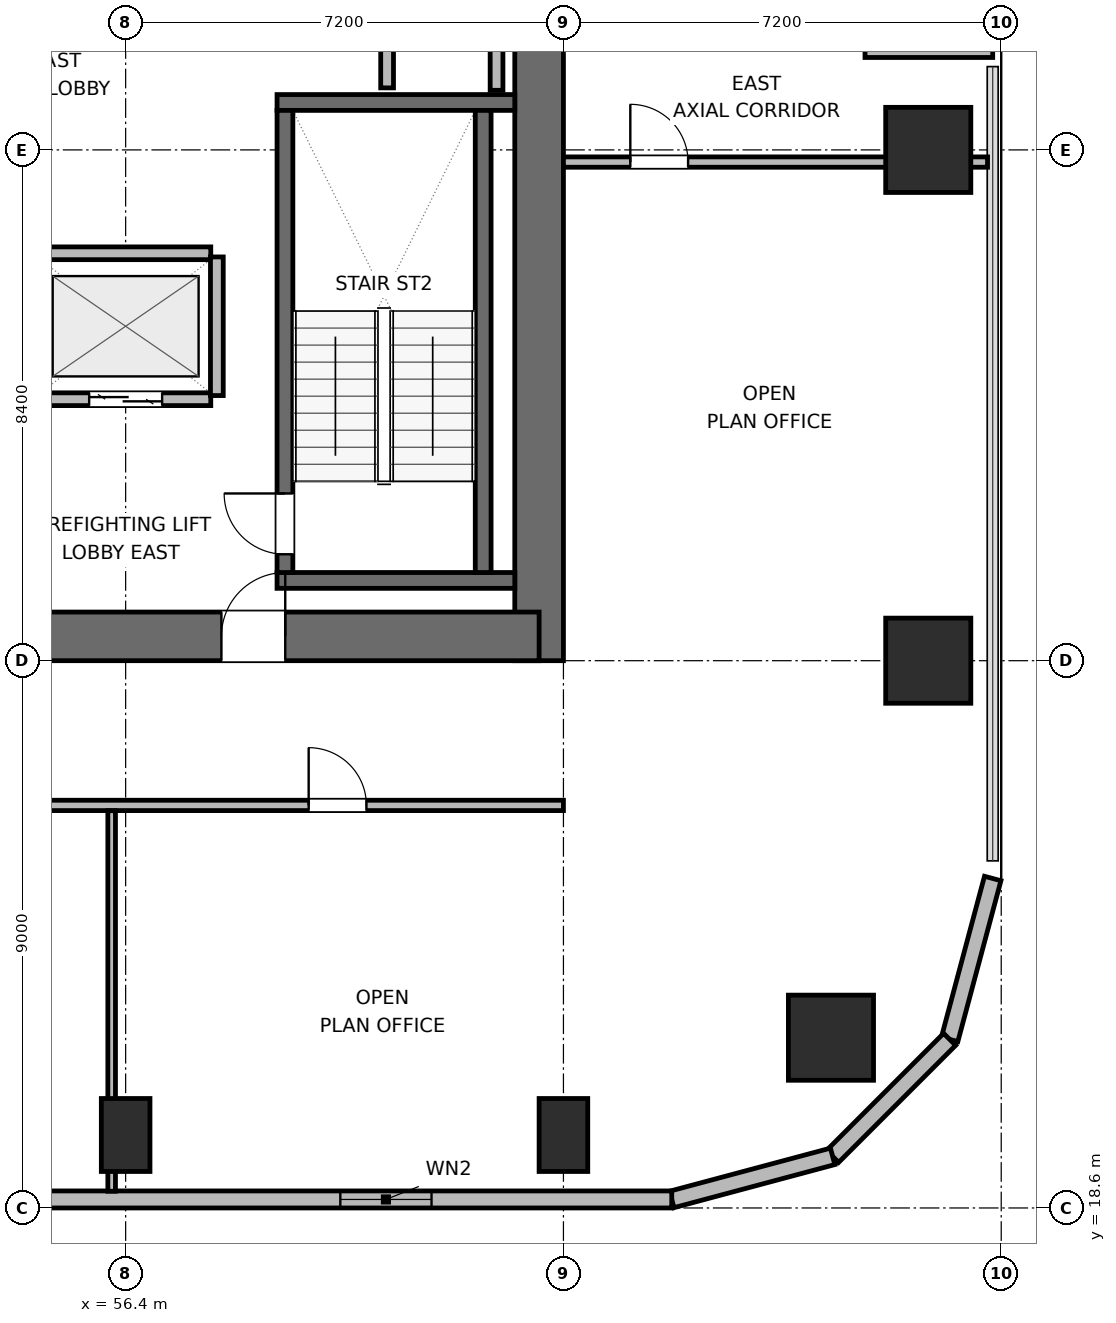
"""IFC4 building model, lengths in metres.
Left out: names, types, materials, properties, quantities, classifications, styles, units other than length and angle.
Written with IfcOpenShell. Run it as: python <this file> out.ifc"""

import sys

from ifc_helpers import new_model, si_unit, direction, frame, frame_2d, origin, origin_2d, place, context, subcontext, project, spatial, rectangle, circle, extrude, element, fill, save


model = new_model("IFC4")
c1 = context("Model", 3, precision=1e-05, world=origin(), true_north=direction((0.0, 1.0)))
c2 = subcontext(c1, "Body", "Model", "MODEL_VIEW")
j1 = project(units=[si_unit("LENGTHUNIT", "METRE"), si_unit("PLANEANGLEUNIT", "RADIAN")], contexts=[c1])
p1 = place(None, origin())
s1 = spatial("IfcSite", under=j1, at=p1, CompositionType="ELEMENT")
p2 = place(p1, origin())
s2 = spatial("IfcBuilding", under=s1, at=p2, CompositionType="ELEMENT")
p3 = place(p2, frame((0.0, 0.0, 154.5)))
s3 = spatial("IfcBuildingStorey", under=s2, at=p3, CompositionType="ELEMENT", Elevation=154.5)
p4 = place(p3, frame((63.2, 27.6, 0.0), z_axis=(0.0, 0.0, 1.0), x_axis=(0.0, 1.0, 0.0)))
e1 = element("IfcWall", 1, at=p4, inside=s3, PredefinedType="SHEAR", context=c2, shape_type="SweptSolid", body=[
    extrude(rectangle(XDim=16.8, YDim=0.8, at=frame_2d((8.4, 0.0))), origin(), (0.0, 0.0, 1.0), 3.9),
])
p5 = place(p3, frame((54.0, 28.0, 0.0), z_axis=(0.0, 0.0, 1.0), x_axis=(1.0, 0.0, 0.0)))
e2 = element("IfcWall", 2, at=p5, inside=s3, PredefinedType="SHEAR", context=c2, shape_type="SweptSolid", body=[
    extrude(rectangle(XDim=9.2, YDim=0.8, at=frame_2d((4.6, 0.0))), origin(), (0.0, 0.0, 1.0), 3.9),
])
p6 = place(p5, frame((3.975, 0.0, 0.0)))
e3 = element("IfcOpeningElement", 3, at=p6, cuts=e2, PredefinedType="OPENING", context=c2, shape_type="SweptSolid", body=[
    extrude(rectangle(XDim=1.05, YDim=2.04, at=frame_2d((0.525, 1.02))), frame((0.0, 0.41, 0.0), z_axis=(0.0, -1.0, 0.0), x_axis=(1.0, 0.0, 0.0)), (0.0, 0.0, 1.0), 0.82),
])
for number, where, z_axis, x_axis in (
    (4, (58.89, 28.92, 0.0), (0.0, 0.0, 1.0), (1.0, 0.0, 0.0)),
    (5, (58.89, 36.78, 0.0), (0.0, 0.0, 1.0), (1.0, 0.0, 0.0)),
):
    element("IfcWall", number, at=place(p3, frame(where, z_axis=z_axis, x_axis=x_axis)), inside=s3, PredefinedType="SHEAR", context=c2, shape_type="SweptSolid", body=[
        extrude(rectangle(XDim=3.91, YDim=0.26, at=frame_2d((1.955, 0.0))), origin(), (0.0, 0.0, 1.0), 3.9),
    ])
p7 = place(p3, frame((59.02, 29.05, 0.0), z_axis=(0.0, 0.0, 1.0), x_axis=(0.0, 1.0, 0.0)))
e6 = element("IfcWall", 6, at=p7, inside=s3, PredefinedType="SHEAR", context=c2, shape_type="SweptSolid", body=[
    extrude(rectangle(XDim=7.6, YDim=0.26, at=frame_2d((3.8, 0.0))), origin(), (0.0, 0.0, 1.0), 3.9),
])
p8 = place(p7, frame((0.3, 0.0, 0.0)))
e7 = element("IfcOpeningElement", 7, at=p8, cuts=e6, PredefinedType="OPENING", context=c2, shape_type="SweptSolid", body=[
    extrude(rectangle(XDim=1.0, YDim=2.04, at=frame_2d((0.5, 1.02))), frame((0.0, 0.14, 0.0), z_axis=(0.0, -1.0, 0.0), x_axis=(1.0, 0.0, 0.0)), (0.0, 0.0, 1.0), 0.28),
])
p9 = place(p3, frame((62.28, 29.05, 0.0), z_axis=(0.0, 0.0, 1.0), x_axis=(0.0, 1.0, 0.0)))
e8 = element("IfcWall", 8, at=p9, inside=s3, PredefinedType="SHEAR", context=c2, shape_type="SweptSolid", body=[
    extrude(rectangle(XDim=7.6, YDim=0.26, at=frame_2d((3.8, 0.0))), origin(), (0.0, 0.0, 1.0), 3.9),
])
p10 = place(p3, frame((68.0, 21.4, 0.0), z_axis=(0.0, 0.0, 1.0), x_axis=(1.0, 0.0, 0.0)))
e9 = element("IfcColumn", 9, at=p10, inside=s3, PredefinedType="COLUMN", context=c2, shape_type="SweptSolid", body=[
    extrude(circle(Radius=0.7, at=origin_2d()), origin(), (0.0, 0.0, 1.0), 3.9),
])
for number, where, z_axis, x_axis in (
    (10, (56.4, 19.8, 0.0), (0.0, 0.0, 1.0), (1.0, 0.0, 0.0)),
    (11, (63.6, 19.8, 0.0), (0.0, 0.0, 1.0), (1.0, 0.0, 0.0)),
):
    element("IfcColumn", number, at=place(p3, frame(where, z_axis=z_axis, x_axis=x_axis)), inside=s3, PredefinedType="COLUMN", context=c2, shape_type="SweptSolid", body=[
        extrude(rectangle(XDim=0.8, YDim=1.2, at=origin_2d()), origin(), (0.0, 0.0, 1.0), 3.9),
    ])
for number, where, z_axis, x_axis in (
    (12, (69.6, 27.6, 0.0), (0.0, 0.0, 1.0), (1.0, 0.0, 0.0)),
    (13, (69.6, 36.0, 0.0), (0.0, 0.0, 1.0), (1.0, 0.0, 0.0)),
):
    element("IfcColumn", number, at=place(p3, frame(where, z_axis=z_axis, x_axis=x_axis)), inside=s3, PredefinedType="COLUMN", context=c2, shape_type="SweptSolid", body=[
        extrude(rectangle(XDim=1.4, YDim=1.4, at=origin_2d()), origin(), (0.0, 0.0, 1.0), 3.9),
    ])
p11 = place(p3, frame((68.56, 37.66, 0.0), z_axis=(0.0, 0.0, 1.0), x_axis=(1.0, 0.0, 0.0)))
e14 = element("IfcWall", 14, at=p11, inside=s3, PredefinedType="SOLIDWALL", context=c2, shape_type="SweptSolid", body=[
    extrude(rectangle(XDim=2.1, YDim=0.28, at=frame_2d((1.05, 0.0))), origin(), (0.0, 0.0, 1.0), 3.116),
])
p12 = place(p3, frame((70.66, 24.018, 0.0), z_axis=(0.0, 0.0, 1.0), x_axis=(-0.258672222976, -0.9659651552, 0.0)))
e15 = element("IfcWall", 15, at=p12, inside=s3, PredefinedType="SOLIDWALL", context=c2, shape_type="SweptSolid", body=[
    extrude(rectangle(XDim=2.739, YDim=0.28, at=frame_2d((1.37, 0.0))), origin(), (0.0, 0.0, 1.0), 3.68),
])
p13 = place(p3, frame((69.951, 21.373, 0.0), z_axis=(0.0, 0.0, 1.0), x_axis=(-0.707061915429, -0.707151644098, 0.0)))
e16 = element("IfcWall", 16, at=p13, inside=s3, PredefinedType="SOLIDWALL", context=c2, shape_type="SweptSolid", body=[
    extrude(rectangle(XDim=2.721, YDim=0.28, at=frame_2d((1.36, 0.0))), origin(), (0.0, 0.0, 1.0), 3.68),
])
p14 = place(p3, frame((68.028, 19.448, 0.0), z_axis=(0.0, 0.0, 1.0), x_axis=(-0.965971118627, -0.258649952598, 0.0)))
e17 = element("IfcWall", 17, at=p14, inside=s3, PredefinedType="SOLIDWALL", context=c2, shape_type="SweptSolid", body=[
    extrude(rectangle(XDim=2.739, YDim=0.28, at=frame_2d((1.37, 0.0))), origin(), (0.0, 0.0, 1.0), 3.68),
])
p15 = place(p3, frame((65.382, 18.74, 0.0), z_axis=(0.0, 0.0, 1.0), x_axis=(-1.0, 0.0, 0.0)))
e18 = element("IfcWall", 18, at=p15, inside=s3, PredefinedType="SOLIDWALL", context=c2, shape_type="SweptSolid", body=[
    extrude(rectangle(XDim=10.742, YDim=0.28, at=frame_2d((5.371, 0.0))), origin(), (0.0, 0.0, 1.0), 3.68),
])
p16 = place(p15, frame((3.951, 0.0, 0.85)))
e19 = element("IfcOpeningElement", 19, at=p16, cuts=e18, PredefinedType="OPENING", context=c2, shape_type="SweptSolid", body=[
    extrude(rectangle(XDim=1.5, YDim=1.1, at=frame_2d((0.75, 0.55))), frame((0.0, 0.15, 0.0), z_axis=(0.0, -1.0, 0.0), x_axis=(1.0, 0.0, 0.0)), (0.0, 0.0, 1.0), 0.3),
])
p17 = place(p3, frame((60.7, 37.02, 0.0), z_axis=(0.0, 0.0, 1.0), x_axis=(0.0, 1.0, 0.0)))
e20 = element("IfcWall", 20, at=p17, inside=s3, PredefinedType="PARTITIONING", context=c2, shape_type="SweptSolid", body=[
    extrude(rectangle(XDim=1.96, YDim=0.21, at=frame_2d((0.98, 0.0))), origin(), (0.0, 0.0, 1.0), 3.68),
])
p18 = place(p3, frame((62.5, 36.98, 0.0), z_axis=(0.0, 0.0, 1.0), x_axis=(0.0, 1.0, 0.0)))
e21 = element("IfcWall", 21, at=p18, inside=s3, PredefinedType="PARTITIONING", context=c2, shape_type="SweptSolid", body=[
    extrude(rectangle(XDim=2.04, YDim=0.21, at=frame_2d((1.02, 0.0))), origin(), (0.0, 0.0, 1.0), 3.68),
])
p19 = place(p3, frame((55.0, 31.9, 0.0), z_axis=(0.0, 0.0, 1.0), x_axis=(1.0, 0.0, 0.0)))
e22 = element("IfcWall", 22, at=p19, inside=s3, PredefinedType="PARTITIONING", context=c2, shape_type="SweptSolid", body=[
    extrude(rectangle(XDim=2.8, YDim=0.21, at=frame_2d((1.4, 0.0))), origin(), (0.0, 0.0, 1.0), 3.68),
])
p20 = place(p19, frame((0.8, 0.0, 0.0)))
e23 = element("IfcOpeningElement", 23, at=p20, cuts=e22, PredefinedType="OPENING", context=c2, shape_type="SweptSolid", body=[
    extrude(rectangle(XDim=1.2, YDim=2.04, at=frame_2d((0.6, 1.02))), frame((0.0, 0.115, 0.0), z_axis=(0.0, -1.0, 0.0), x_axis=(1.0, 0.0, 0.0)), (0.0, 0.0, 1.0), 0.23),
])
p21 = place(p3, frame((54.32, 34.3, 0.0), z_axis=(0.0, 0.0, 1.0), x_axis=(1.0, 0.0, 0.0)))
e24 = element("IfcWall", 24, at=p21, inside=s3, PredefinedType="PARTITIONING", context=c2, shape_type="SweptSolid", body=[
    extrude(rectangle(XDim=3.48, YDim=0.21, at=frame_2d((1.74, 0.0))), origin(), (0.0, 0.0, 1.0), 3.68),
])
p22 = place(p3, frame((57.9, 31.96, 0.0), z_axis=(0.0, 0.0, 1.0), x_axis=(0.0, 1.0, 0.0)))
e25 = element("IfcWall", 25, at=p22, inside=s3, PredefinedType="PARTITIONING", context=c2, shape_type="SweptSolid", body=[
    extrude(rectangle(XDim=2.28, YDim=0.21, at=frame_2d((1.14, 0.0))), origin(), (0.0, 0.0, 1.0), 3.68),
])
p23 = place(p3, frame((30.075, 25.22, 0.0), z_axis=(0.0, 0.0, 1.0), x_axis=(1.0, 0.0, 0.0)))
e26 = element("IfcWall", 26, at=p23, inside=s3, PredefinedType="PARTITIONING", context=c2, shape_type="SweptSolid", body=[
    extrude(rectangle(XDim=33.525, YDim=0.17, at=frame_2d((16.763, 0.0))), origin(), (0.0, 0.0, 1.0), 3.68),
])
p24 = place(p23, frame((3.238, 0.0, 0.0)))
e27 = element("IfcOpeningElement", 27, at=p24, cuts=e26, PredefinedType="OPENING", context=c2, shape_type="SweptSolid", body=[
    extrude(rectangle(XDim=0.95, YDim=2.04, at=frame_2d((0.475, 1.02))), frame((0.0, 0.095, 0.0), z_axis=(0.0, -1.0, 0.0), x_axis=(1.0, 0.0, 0.0)), (0.0, 0.0, 1.0), 0.19),
])
p25 = place(p23, frame((10.065, 0.0, 0.0)))
e28 = element("IfcOpeningElement", 28, at=p25, cuts=e26, PredefinedType="OPENING", context=c2, shape_type="SweptSolid", body=[
    extrude(rectangle(XDim=0.95, YDim=2.04, at=frame_2d((0.475, 1.02))), frame((0.0, 0.095, 0.0), z_axis=(0.0, -1.0, 0.0), x_axis=(1.0, 0.0, 0.0)), (0.0, 0.0, 1.0), 0.19),
])
p26 = place(p23, frame((16.29, 0.0, 0.0)))
e29 = element("IfcOpeningElement", 29, at=p26, cuts=e26, PredefinedType="OPENING", context=c2, shape_type="SweptSolid", body=[
    extrude(rectangle(XDim=0.95, YDim=2.04, at=frame_2d((0.475, 1.02))), frame((0.0, 0.095, 0.0), z_axis=(0.0, -1.0, 0.0), x_axis=(1.0, 0.0, 0.0)), (0.0, 0.0, 1.0), 0.19),
])
p27 = place(p23, frame((22.51, 0.0, 0.0)))
e30 = element("IfcOpeningElement", 30, at=p27, cuts=e26, PredefinedType="OPENING", context=c2, shape_type="SweptSolid", body=[
    extrude(rectangle(XDim=0.95, YDim=2.04, at=frame_2d((0.475, 1.02))), frame((0.0, 0.095, 0.0), z_axis=(0.0, -1.0, 0.0), x_axis=(1.0, 0.0, 0.0)), (0.0, 0.0, 1.0), 0.19),
])
p28 = place(p23, frame((29.335, 0.0, 0.0)))
e31 = element("IfcOpeningElement", 31, at=p28, cuts=e26, PredefinedType="OPENING", context=c2, shape_type="SweptSolid", body=[
    extrude(rectangle(XDim=0.95, YDim=2.04, at=frame_2d((0.475, 1.02))), frame((0.0, 0.095, 0.0), z_axis=(0.0, -1.0, 0.0), x_axis=(1.0, 0.0, 0.0)), (0.0, 0.0, 1.0), 0.19),
])
p29 = place(p3, frame((56.17, 18.875, 0.0), z_axis=(0.0, 0.0, 1.0), x_axis=(0.0, 1.0, 0.0)))
e32 = element("IfcWall", 32, at=p29, inside=s3, PredefinedType="PARTITIONING", context=c2, shape_type="SweptSolid", body=[
    extrude(rectangle(XDim=6.258, YDim=0.125, at=frame_2d((3.129, 0.0))), origin(), (0.0, 0.0, 1.0), 3.043),
])
p30 = place(p3, frame((63.6, 35.8, 0.0), z_axis=(0.0, 0.0, 1.0), x_axis=(1.0, 0.0, 0.0)))
e33 = element("IfcWall", 33, at=p30, inside=s3, PredefinedType="PARTITIONING", context=c2, shape_type="SweptSolid", body=[
    extrude(rectangle(XDim=6.975, YDim=0.17, at=frame_2d((3.487, 0.0))), origin(), (0.0, 0.0, 1.0), 3.043),
])
p31 = place(p30, frame((1.1, 0.0, 0.0)))
e34 = element("IfcOpeningElement", 34, at=p31, cuts=e33, PredefinedType="OPENING", context=c2, shape_type="SweptSolid", body=[
    extrude(rectangle(XDim=0.95, YDim=2.04, at=frame_2d((0.475, 1.02))), frame((0.0, 0.095, 0.0), z_axis=(0.0, -1.0, 0.0), x_axis=(1.0, 0.0, 0.0)), (0.0, 0.0, 1.0), 0.19),
])
p32 = place(p16, origin())
e35 = element("IfcWindow", 35, at=p32, inside=s3, PartitioningType="SINGLE_PANEL", PredefinedType="WINDOW", context=c2, shape_type="SweptSolid", body=[
    extrude(rectangle(XDim=1.5, YDim=1.1, at=frame_2d((0.75, 0.55))), frame((0.0, 0.03, 0.0), z_axis=(0.0, -1.0, 0.0), x_axis=(1.0, 0.0, 0.0)), (0.0, 0.0, 1.0), 0.06),
])
fill(e19, e35)
p33 = place(p8, origin())
e36 = element("IfcDoor", 36, at=p33, inside=s3, OperationType="SINGLE_SWING_RIGHT", PredefinedType="DOOR", context=c2, shape_type="SweptSolid", body=[
    extrude(rectangle(XDim=1.0, YDim=2.04, at=frame_2d((0.5, 1.02))), frame((0.0, 0.025, 0.0), z_axis=(0.0, -1.0, 0.0), x_axis=(1.0, 0.0, 0.0)), (0.0, 0.0, 1.0), 0.05),
])
fill(e7, e36)
p34 = place(p20, origin())
e37 = element("IfcDoor", 37, at=p34, inside=s3, OperationType="DOUBLE_DOOR_SLIDING", PredefinedType="DOOR", context=c2, shape_type="SweptSolid", body=[
    extrude(rectangle(XDim=1.2, YDim=2.04, at=frame_2d((0.6, 1.02))), frame((0.0, 0.025, 0.0), z_axis=(0.0, -1.0, 0.0), x_axis=(1.0, 0.0, 0.0)), (0.0, 0.0, 1.0), 0.05),
])
fill(e23, e37)
p35 = place(p6, origin())
e38 = element("IfcDoor", 38, at=p35, inside=s3, OperationType="SINGLE_SWING_RIGHT", PredefinedType="DOOR", context=c2, shape_type="SweptSolid", body=[
    extrude(rectangle(XDim=1.05, YDim=2.04, at=frame_2d((0.525, 1.02))), frame((0.0, 0.025, 0.0), z_axis=(0.0, -1.0, 0.0), x_axis=(1.0, 0.0, 0.0)), (0.0, 0.0, 1.0), 0.05),
])
fill(e3, e38)
p36 = place(p28, origin())
e39 = element("IfcDoor", 39, at=p36, inside=s3, OperationType="SINGLE_SWING_LEFT", PredefinedType="DOOR", context=c2, shape_type="SweptSolid", body=[
    extrude(rectangle(XDim=0.95, YDim=2.04, at=frame_2d((0.475, 1.02))), frame((0.0, 0.025, 0.0), z_axis=(0.0, -1.0, 0.0), x_axis=(1.0, 0.0, 0.0)), (0.0, 0.0, 1.0), 0.05),
])
fill(e31, e39)
p37 = place(p31, origin())
e40 = element("IfcDoor", 40, at=p37, inside=s3, OperationType="SINGLE_SWING_LEFT", PredefinedType="DOOR", context=c2, shape_type="SweptSolid", body=[
    extrude(rectangle(XDim=0.95, YDim=2.04, at=frame_2d((0.475, 1.02))), frame((0.0, 0.025, 0.0), z_axis=(0.0, -1.0, 0.0), x_axis=(1.0, 0.0, 0.0)), (0.0, 0.0, 1.0), 0.05),
])
fill(e34, e40)
save(model, sys.argv[1])
